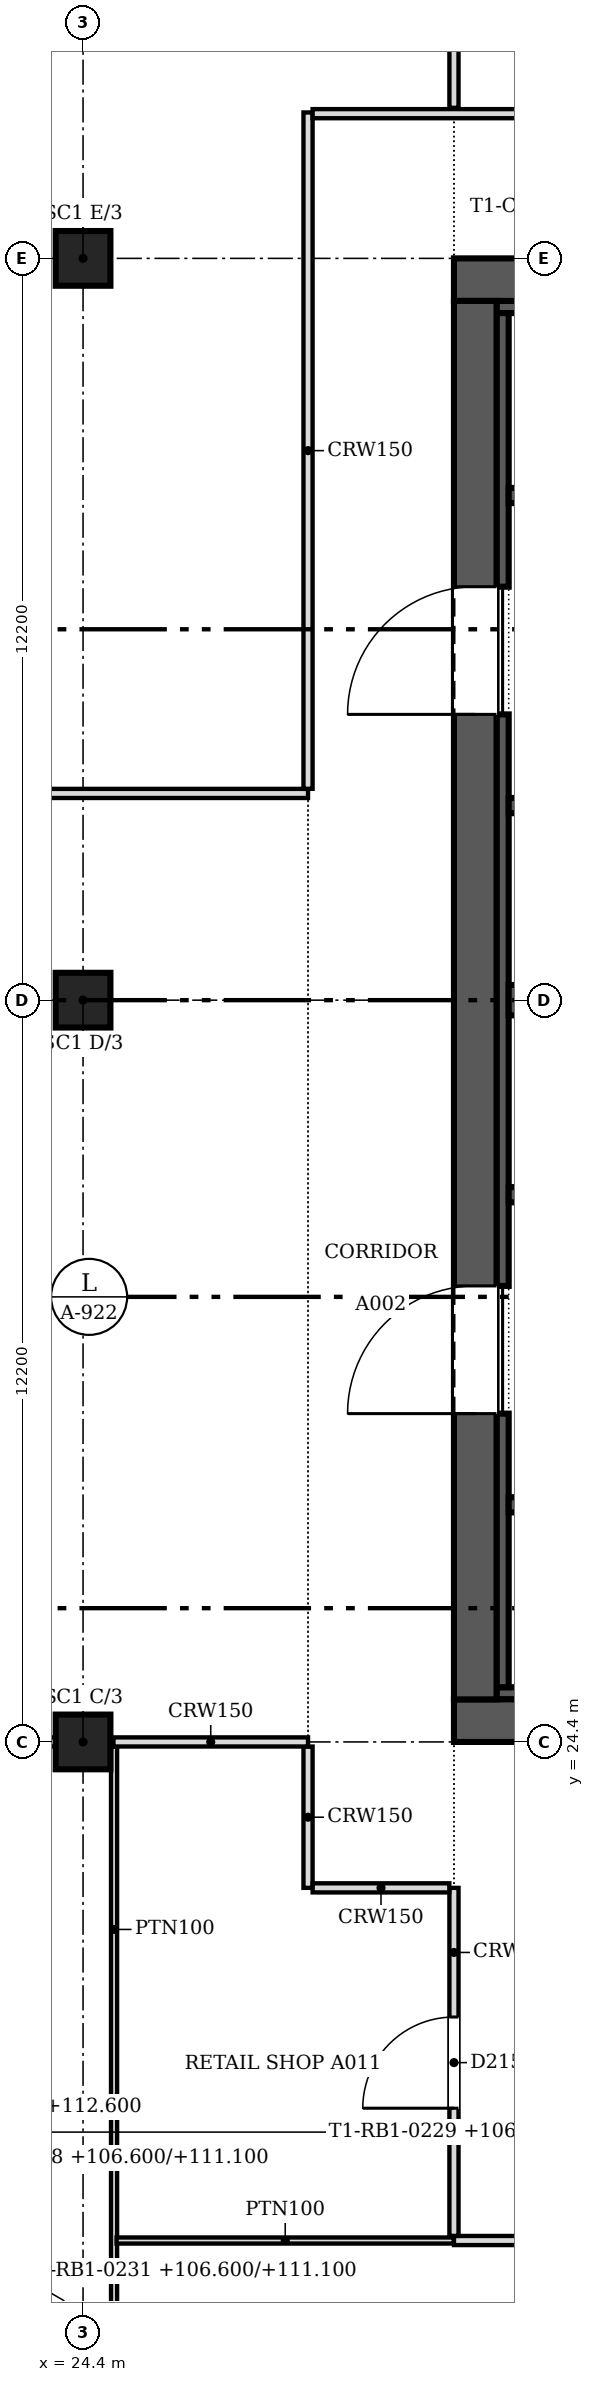
"""IFC4 building model, lengths in metres.
Left out: names, types, materials, properties, quantities, classifications, styles, units other than length and angle.
Written with IfcOpenShell. Run it as: python <this file> out.ifc"""

import sys

from ifc_helpers import new_model, si_unit, direction, frame, frame_2d, origin, origin_2d, place, context, subcontext, project, spatial, rectangle, extrude, faceted_brep, source, transform, mapped, element, fill, save


model = new_model("IFC4")
c1 = context("Model", 3, precision=1e-05, world=origin(), true_north=direction((0.0, 1.0)))
c2 = subcontext(c1, "Body", "Model", "MODEL_VIEW")
j1 = project(units=[si_unit("LENGTHUNIT", "METRE"), si_unit("PLANEANGLEUNIT", "RADIAN")], contexts=[c1])
p1 = place(None, origin())
s1 = spatial("IfcSite", under=j1, at=p1, CompositionType="ELEMENT")
p2 = place(p1, origin())
s2 = spatial("IfcBuilding", under=s1, at=p2, CompositionType="ELEMENT")
p3 = place(p2, frame((0.0, 0.0, 106.6)))
s3 = spatial("IfcBuildingStorey", under=s2, at=p3, CompositionType="ELEMENT", Elevation=106.6)
for number, where, z_axis, x_axis in (
    (1, (24.4, 24.4, 0.0), (0.0, 0.0, 1.0), (1.0, 0.0, 0.0)),
    (2, (24.4, 36.6, 0.0), (0.0, 0.0, 1.0), (1.0, 0.0, 0.0)),
    (3, (24.4, 48.8, 0.0), (0.0, 0.0, 1.0), (1.0, 0.0, 0.0)),
):
    element("IfcColumn", number, at=place(p3, frame(where, z_axis=z_axis, x_axis=x_axis)), inside=s3, PredefinedType="COLUMN", context=c2, shape_type="SweptSolid", body=[
        extrude(rectangle(XDim=0.9, YDim=0.9, at=origin_2d()), origin(), (0.0, 0.0, 1.0), 5.8),
    ])
m1 = source(origin(), c2, "Body", "Brep", [
    faceted_brep([(0.053, -0.25, 0.0), (0.8, -0.25, 0.0), (0.8, -0.25, 4.5), (0.053, -0.25, 4.5), (0.0, 0.25, 4.5), (0.8, 0.25, 4.5), (0.8, 0.25, 0.0), (0.0, 0.25, 0.0), (0.0, 0.0, 0.0), (0.0, 0.0, 4.5)], [[[0, 1, 2, 3]], [[4, 5, 6, 7]], [[7, 6, 1, 0, 8]], [[5, 4, 9, 3, 2]], [[4, 7, 8, 9]], [[8, 0, 3, 9]], [[1, 6, 5, 2]]]),
])
p4 = place(p3, frame((23.517, 15.185, 0.0), z_axis=(0.0, 0.0, 1.0), x_axis=(0.359735468129, -0.933054335486, 0.0)))
e4 = element("IfcWall", 4, at=p4, inside=s3, PredefinedType="SOLIDWALL", context=c2, shape_type="MappedRepresentation", body=[
    mapped(m1, transform((0.0, 0.0, 0.0), scale=1.0)),
])
m2 = source(origin(), c2, "Body", "Brep", [
    faceted_brep([(0.053, -0.25, 0.0), (3.103, -0.25, 0.0), (3.103, -0.25, 1.5), (0.053, -0.25, 1.5), (0.0, 0.25, 1.5), (3.149, 0.25, 1.5), (3.149, 0.25, 0.0), (0.0, 0.25, 0.0), (3.149, -0.0, 0.0), (0.0, 0.0, 0.0), (3.149, -0.0, 1.5), (0.0, 0.0, 1.5)], [[[0, 1, 2, 3]], [[4, 5, 6, 7]], [[7, 6, 8, 1, 0, 9]], [[6, 5, 10, 8]], [[5, 4, 11, 3, 2, 10]], [[4, 7, 9, 11]], [[9, 0, 3, 11]], [[1, 8, 10, 2]]]),
])
p5 = place(p3, frame((23.517, 15.185, 4.5), z_axis=(0.0, 0.0, 1.0), x_axis=(0.359841220347, -0.933013556246, 0.0)))
e5 = element("IfcWall", 5, at=p5, inside=s3, PredefinedType="SOLIDWALL", context=c2, shape_type="MappedRepresentation", body=[
    mapped(m2, transform((0.0, 0.0, 0.0), scale=1.0)),
])
p6 = place(p3, frame((54.9, 24.75, 0.0), z_axis=(0.0, 0.0, 1.0), x_axis=(-1.0, 0.0, 0.0)))
e6 = element("IfcWall", 6, at=p6, inside=s3, PredefinedType="SHEAR", context=c2, shape_type="SweptSolid", body=[
    extrude(rectangle(XDim=24.4, YDim=0.7, at=frame_2d((12.2, 0.0))), origin(), (0.0, 0.0, 1.0), 6.0),
])
m3 = source(origin(), c2, "Body", "SweptSolid", [
    extrude(rectangle(XDim=1.2, YDim=2.1, at=frame_2d((0.6, 1.05))), frame((0.0, 0.36, 0.0), z_axis=(0.0, -1.0, 0.0), x_axis=(1.0, 0.0, 0.0)), (0.0, 0.0, 1.0), 0.72),
])
p7 = place(p6, frame((1.5, 0.0, 0.0)))
e7 = element("IfcOpeningElement", 7, at=p7, cuts=e6, PredefinedType="OPENING", context=c2, shape_type="MappedRepresentation", body=[
    mapped(m3, transform((0.0, 0.0, 0.0), scale=1.0)),
])
p8 = place(p3, frame((30.85, 25.1, 0.0), z_axis=(0.0, 0.0, 1.0), x_axis=(0.0, 1.0, 0.0)))
e8 = element("IfcWall", 8, at=p8, inside=s3, PredefinedType="SHEAR", context=c2, shape_type="SweptSolid", body=[
    extrude(rectangle(XDim=23.0, YDim=0.7, at=frame_2d((11.5, 0.0))), origin(), (0.0, 0.0, 1.0), 6.0),
])
m4 = source(origin(), c2, "Body", "SweptSolid", [
    extrude(rectangle(XDim=2.1, YDim=2.4, at=frame_2d((1.05, 1.2))), frame((0.0, 0.36, 0.0), z_axis=(0.0, -1.0, 0.0), x_axis=(1.0, 0.0, 0.0)), (0.0, 0.0, 1.0), 0.72),
])
p9 = place(p8, frame((4.7, 0.0, 0.0)))
e9 = element("IfcOpeningElement", 9, at=p9, cuts=e8, PredefinedType="OPENING", context=c2, shape_type="MappedRepresentation", body=[
    mapped(m4, transform((0.0, 0.0, 0.0), scale=1.0)),
])
p10 = place(p8, frame((16.2, 0.0, 0.0)))
e10 = element("IfcOpeningElement", 10, at=p10, cuts=e8, PredefinedType="OPENING", context=c2, shape_type="MappedRepresentation", body=[
    mapped(m4, transform((0.0, 0.0, 0.0), scale=1.0)),
])
p11 = place(p3, frame((30.5, 48.45, 0.0), z_axis=(0.0, 0.0, 1.0), x_axis=(1.0, 0.0, 0.0)))
e11 = element("IfcWall", 11, at=p11, inside=s3, PredefinedType="SHEAR", context=c2, shape_type="SweptSolid", body=[
    extrude(rectangle(XDim=24.4, YDim=0.7, at=frame_2d((12.2, 0.0))), origin(), (0.0, 0.0, 1.0), 6.0),
])
p12 = place(p3, frame((31.2, 25.2, 0.0), z_axis=(0.0, 0.0, 1.0), x_axis=(1.0, 0.0, 0.0)))
e12 = element("IfcWall", 12, at=p12, inside=s3, PredefinedType="SOLIDWALL", context=c2, shape_type="SweptSolid", body=[
    extrude(rectangle(XDim=21.0, YDim=0.2, at=frame_2d((10.5, 0.0))), origin(), (0.0, 0.0, 1.0), 6.0),
])
p13 = place(p3, frame((31.2, 48.0, 0.0), z_axis=(0.0, 0.0, 1.0), x_axis=(1.0, 0.0, 0.0)))
e13 = element("IfcWall", 13, at=p13, inside=s3, PredefinedType="SOLIDWALL", context=c2, shape_type="SweptSolid", body=[
    extrude(rectangle(XDim=23.0, YDim=0.2, at=frame_2d((11.5, 0.0))), origin(), (0.0, 0.0, 1.0), 6.0),
])
p14 = place(p3, frame((31.3, 25.3, 0.0), z_axis=(0.0, 0.0, 1.0), x_axis=(0.0, 1.0, 0.0)))
e14 = element("IfcWall", 14, at=p14, inside=s3, PredefinedType="SOLIDWALL", context=c2, shape_type="SweptSolid", body=[
    extrude(rectangle(XDim=4.5, YDim=0.2, at=frame_2d((2.25, 0.0))), origin(), (0.0, 0.0, 1.0), 6.0),
])
p15 = place(p3, frame((31.3, 31.9, 0.0), z_axis=(0.0, 0.0, 1.0), x_axis=(0.0, 1.0, 0.0)))
e15 = element("IfcWall", 15, at=p15, inside=s3, PredefinedType="SOLIDWALL", context=c2, shape_type="SweptSolid", body=[
    extrude(rectangle(XDim=9.4, YDim=0.2, at=frame_2d((4.7, 0.0))), origin(), (0.0, 0.0, 1.0), 6.0),
])
p16 = place(p3, frame((31.3, 43.4, 0.0), z_axis=(0.0, 0.0, 1.0), x_axis=(0.0, 1.0, 0.0)))
e16 = element("IfcWall", 16, at=p16, inside=s3, PredefinedType="SOLIDWALL", context=c2, shape_type="SweptSolid", body=[
    extrude(rectangle(XDim=4.5, YDim=0.2, at=frame_2d((2.25, 0.0))), origin(), (0.0, 0.0, 1.0), 6.0),
])
p17 = place(p3, frame((31.4, 36.6, 0.0), z_axis=(0.0, 0.0, 1.0), x_axis=(1.0, 0.0, 0.0)))
e17 = element("IfcWall", 17, at=p17, inside=s3, PredefinedType="SHEAR", context=c2, shape_type="SweptSolid", body=[
    extrude(rectangle(XDim=16.95, YDim=0.5, at=frame_2d((8.475, 0.0))), origin(), (0.0, 0.0, 1.0), 6.0),
])
p18 = place(p3, frame((31.4, 33.4, 0.0), z_axis=(0.0, 0.0, 1.0), x_axis=(1.0, 0.0, 0.0)))
e18 = element("IfcWall", 18, at=p18, inside=s3, PredefinedType="SOLIDWALL", context=c2, shape_type="SweptSolid", body=[
    extrude(rectangle(XDim=11.05, YDim=0.25, at=frame_2d((5.525, 0.0))), origin(), (0.0, 0.0, 1.0), 5.8),
])
p19 = place(p3, frame((31.4, 39.8, 0.0), z_axis=(0.0, 0.0, 1.0), x_axis=(1.0, 0.0, 0.0)))
e19 = element("IfcWall", 19, at=p19, inside=s3, PredefinedType="SOLIDWALL", context=c2, shape_type="SweptSolid", body=[
    extrude(rectangle(XDim=11.05, YDim=0.25, at=frame_2d((5.525, 0.0))), origin(), (0.0, 0.0, 1.0), 6.0),
])
m5 = source(origin(), c2, "Body", "SweptSolid", [
    extrude(rectangle(XDim=1.1, YDim=2.1, at=frame_2d((0.55, 1.05))), frame((0.0, 0.135, 0.0), z_axis=(0.0, -1.0, 0.0), x_axis=(1.0, 0.0, 0.0)), (0.0, 0.0, 1.0), 0.27),
])
p20 = place(p19, frame((0.863, 0.0, 0.0)))
e20 = element("IfcOpeningElement", 20, at=p20, cuts=e19, PredefinedType="OPENING", context=c2, shape_type="MappedRepresentation", body=[
    mapped(m5, transform((0.0, 0.0, 0.0), scale=1.0)),
])
p21 = place(p19, frame((3.688, 0.0, 0.0)))
e21 = element("IfcOpeningElement", 21, at=p21, cuts=e19, PredefinedType="OPENING", context=c2, shape_type="MappedRepresentation", body=[
    mapped(m5, transform((0.0, 0.0, 0.0), scale=1.0)),
])
p22 = place(p19, frame((6.512, 0.0, 0.0)))
e22 = element("IfcOpeningElement", 22, at=p22, cuts=e19, PredefinedType="OPENING", context=c2, shape_type="MappedRepresentation", body=[
    mapped(m5, transform((0.0, 0.0, 0.0), scale=1.0)),
])
p23 = place(p19, frame((9.337, 0.0, 0.0)))
e23 = element("IfcOpeningElement", 23, at=p23, cuts=e19, PredefinedType="OPENING", context=c2, shape_type="MappedRepresentation", body=[
    mapped(m5, transform((0.0, 0.0, 0.0), scale=1.0)),
])
p24 = place(p3, frame((31.4, 28.3, 0.0), z_axis=(0.0, 0.0, 1.0), x_axis=(1.0, 0.0, 0.0)))
e24 = element("IfcWall", 24, at=p24, inside=s3, PredefinedType="SOLIDWALL", context=c2, shape_type="SweptSolid", body=[
    extrude(rectangle(XDim=11.05, YDim=0.25, at=frame_2d((5.525, 0.0))), origin(), (0.0, 0.0, 1.0), 5.8),
])
p25 = place(p3, frame((42.45, 44.9, 0.0), z_axis=(0.0, 0.0, 1.0), x_axis=(-1.0, 0.0, 0.0)))
e25 = element("IfcWall", 25, at=p25, inside=s3, PredefinedType="SOLIDWALL", context=c2, shape_type="SweptSolid", body=[
    extrude(rectangle(XDim=11.05, YDim=0.25, at=frame_2d((5.525, 0.0))), origin(), (0.0, 0.0, 1.0), 6.0),
])
p26 = place(p25, frame((9.087, 0.0, 0.0)))
e26 = element("IfcOpeningElement", 26, at=p26, cuts=e25, PredefinedType="OPENING", context=c2, shape_type="MappedRepresentation", body=[
    mapped(m5, transform((0.0, 0.0, 0.0), scale=1.0)),
])
p27 = place(p25, frame((6.262, 0.0, 0.0)))
e27 = element("IfcOpeningElement", 27, at=p27, cuts=e25, PredefinedType="OPENING", context=c2, shape_type="MappedRepresentation", body=[
    mapped(m5, transform((0.0, 0.0, 0.0), scale=1.0)),
])
p28 = place(p25, frame((3.438, 0.0, 0.0)))
e28 = element("IfcOpeningElement", 28, at=p28, cuts=e25, PredefinedType="OPENING", context=c2, shape_type="MappedRepresentation", body=[
    mapped(m5, transform((0.0, 0.0, 0.0), scale=1.0)),
])
p29 = place(p25, frame((0.613, 0.0, 0.0)))
e29 = element("IfcOpeningElement", 29, at=p29, cuts=e25, PredefinedType="OPENING", context=c2, shape_type="MappedRepresentation", body=[
    mapped(m5, transform((0.0, 0.0, 0.0), scale=1.0)),
])
p30 = place(p3, frame((24.91, 12.293, 0.0), z_axis=(0.0, 0.0, 1.0), x_axis=(0.0, 1.0, 0.0)))
e30 = element("IfcWall", 30, at=p30, inside=s3, PredefinedType="PARTITIONING", context=c2, shape_type="SweptSolid", body=[
    extrude(rectangle(XDim=12.031, YDim=0.1, at=frame_2d((6.015, 0.0))), origin(), (0.0, 0.0, 1.0), 5.167),
])
p31 = place(p3, frame((24.951, 16.2, 0.0), z_axis=(0.0, 0.0, 1.0), x_axis=(1.0, 0.0, 0.0)))
e31 = element("IfcWall", 31, at=p31, inside=s3, PredefinedType="PARTITIONING", context=c2, shape_type="SweptSolid", body=[
    extrude(rectangle(XDim=5.548, YDim=0.1, at=frame_2d((2.774, 0.0))), origin(), (0.0, 0.0, 1.0), 5.167),
])
p32 = place(p3, frame((44.0, 16.2, 0.0), z_axis=(0.0, 0.0, 1.0), x_axis=(-1.0, 0.0, 0.0)))
e32 = element("IfcWall", 32, at=p32, inside=s3, PredefinedType="PARTITIONING", context=c2, shape_type="SweptSolid", body=[
    extrude(rectangle(XDim=13.5, YDim=0.15, at=frame_2d((6.75, 0.0))), origin(), (0.0, 0.0, 1.0), 5.167),
])
m6 = source(origin(), c2, "Body", "SweptSolid", [
    extrude(rectangle(XDim=1.8, YDim=2.1, at=frame_2d((0.9, 1.05))), frame((0.0, 0.085, 0.0), z_axis=(0.0, -1.0, 0.0), x_axis=(1.0, 0.0, 0.0)), (0.0, 0.0, 1.0), 0.17),
])
p33 = place(p32, frame((5.9, 0.0, 0.0)))
e33 = element("IfcOpeningElement", 33, at=p33, cuts=e32, PredefinedType="OPENING", context=c2, shape_type="MappedRepresentation", body=[
    mapped(m6, transform((0.0, 0.0, 0.0), scale=1.0)),
])
p34 = place(p3, frame((30.5, 16.276, 0.0), z_axis=(0.0, 0.0, 1.0), x_axis=(0.0, 1.0, 0.0)))
e34 = element("IfcWall", 34, at=p34, inside=s3, PredefinedType="PARTITIONING", context=c2, shape_type="SweptSolid", body=[
    extrude(rectangle(XDim=5.724, YDim=0.15, at=frame_2d((2.862, 0.0))), origin(), (0.0, 0.0, 1.0), 5.167),
])
m7 = source(origin(), c2, "Body", "SweptSolid", [
    extrude(rectangle(XDim=1.5, YDim=2.1, at=frame_2d((0.75, 1.05))), frame((0.0, 0.085, 0.0), z_axis=(0.0, -1.0, 0.0), x_axis=(1.0, 0.0, 0.0)), (0.0, 0.0, 1.0), 0.17),
])
p35 = place(p34, frame((2.1, 0.0, 0.0)))
e35 = element("IfcOpeningElement", 35, at=p35, cuts=e34, PredefinedType="OPENING", context=c2, shape_type="MappedRepresentation", body=[
    mapped(m7, transform((0.0, 0.0, 0.0), scale=1.0)),
])
p36 = place(p3, frame((28.1, 22.0, 0.0), z_axis=(0.0, 0.0, 1.0), x_axis=(0.0, 1.0, 0.0)))
e36 = element("IfcWall", 36, at=p36, inside=s3, PredefinedType="PARTITIONING", context=c2, shape_type="SweptSolid", body=[
    extrude(rectangle(XDim=2.324, YDim=0.15, at=frame_2d((1.162, 0.0))), origin(), (0.0, 0.0, 1.0), 5.167),
])
p37 = place(p3, frame((28.176, 22.0, 0.0), z_axis=(0.0, 0.0, 1.0), x_axis=(1.0, 0.0, 0.0)))
e37 = element("IfcWall", 37, at=p37, inside=s3, PredefinedType="PARTITIONING", context=c2, shape_type="SweptSolid", body=[
    extrude(rectangle(XDim=2.248, YDim=0.15, at=frame_2d((1.124, 0.0))), origin(), (0.0, 0.0, 1.0), 5.167),
])
p38 = place(p3, frame((23.949, 24.4, 0.0), z_axis=(0.0, 0.0, 1.0), x_axis=(-1.0, 0.0, 0.0)))
e38 = element("IfcWall", 38, at=p38, inside=s3, PredefinedType="PARTITIONING", context=c2, shape_type="SweptSolid", body=[
    extrude(rectangle(XDim=11.298, YDim=0.15, at=frame_2d((5.649, 0.0))), origin(), (0.0, 0.0, 1.0), 5.167),
])
p39 = place(p38, frame((4.898, 0.0, 0.0)))
e39 = element("IfcOpeningElement", 39, at=p39, cuts=e38, PredefinedType="OPENING", context=c2, shape_type="MappedRepresentation", body=[
    mapped(m7, transform((0.0, 0.0, 0.0), scale=1.0)),
])
p40 = place(p3, frame((24.9, 24.4, 0.0), z_axis=(0.0, 0.0, 1.0), x_axis=(1.0, 0.0, 0.0)))
e40 = element("IfcWall", 40, at=p40, inside=s3, PredefinedType="PARTITIONING", context=c2, shape_type="SweptSolid", body=[
    extrude(rectangle(XDim=3.2, YDim=0.15, at=frame_2d((1.6, 0.0))), origin(), (0.0, 0.0, 1.0), 5.167),
])
p41 = place(p3, frame((12.2, 40.0, 0.0), z_axis=(0.0, 0.0, 1.0), x_axis=(1.0, 0.0, 0.0)))
e41 = element("IfcWall", 41, at=p41, inside=s3, PredefinedType="PARTITIONING", context=c2, shape_type="SweptSolid", body=[
    extrude(rectangle(XDim=15.9, YDim=0.15, at=frame_2d((7.95, 0.0))), origin(), (0.0, 0.0, 1.0), 5.167),
])
p42 = place(p3, frame((28.1, 40.076, 0.0), z_axis=(0.0, 0.0, 1.0), x_axis=(0.0, 1.0, 0.0)))
e42 = element("IfcWall", 42, at=p42, inside=s3, PredefinedType="PARTITIONING", context=c2, shape_type="SweptSolid", body=[
    extrude(rectangle(XDim=11.124, YDim=0.15, at=frame_2d((5.562, 0.0))), origin(), (0.0, 0.0, 1.0), 5.167),
])
p43 = place(p3, frame((28.176, 51.18, 0.0), z_axis=(0.0, 0.0, 1.0), x_axis=(1.0, 0.0, 0.0)))
e43 = element("IfcWall", 43, at=p43, inside=s3, PredefinedType="PARTITIONING", context=c2, shape_type="SweptSolid", body=[
    extrude(rectangle(XDim=31.362, YDim=0.15, at=frame_2d((15.681, 0.0))), origin(), (0.0, 0.0, 1.0), 5.167),
])
m8 = source(origin(), c2, "Body", "SweptSolid", [
    extrude(rectangle(XDim=0.9, YDim=2.1, at=frame_2d((0.45, 1.05))), frame((0.0, 0.085, 0.0), z_axis=(0.0, -1.0, 0.0), x_axis=(1.0, 0.0, 0.0)), (0.0, 0.0, 1.0), 0.17),
])
p44 = place(p43, frame((11.025, 0.0, 0.0)))
e44 = element("IfcOpeningElement", 44, at=p44, cuts=e43, PredefinedType="OPENING", context=c2, shape_type="MappedRepresentation", body=[
    mapped(m8, transform((0.0, 0.0, 0.0), scale=1.0)),
])
p45 = place(p43, frame((4.924, 0.0, 0.0)))
e45 = element("IfcOpeningElement", 45, at=p45, cuts=e43, PredefinedType="OPENING", context=c2, shape_type="MappedRepresentation", body=[
    mapped(m8, transform((0.0, 0.0, 0.0), scale=1.0)),
])
p46 = place(p43, frame((27.075, 0.0, 0.0)))
e46 = element("IfcOpeningElement", 46, at=p46, cuts=e43, PredefinedType="OPENING", context=c2, shape_type="MappedRepresentation", body=[
    mapped(m8, transform((0.0, 0.0, 0.0), scale=1.0)),
])
p47 = place(p43, frame((18.624, 0.0, 0.0)))
e47 = element("IfcOpeningElement", 47, at=p47, cuts=e43, PredefinedType="OPENING", context=c2, shape_type="MappedRepresentation", body=[
    mapped(m8, transform((0.0, 0.0, 0.0), scale=1.0)),
])
p48 = place(p3, frame((30.5, 51.276, 0.0), z_axis=(0.0, 0.0, 1.0), x_axis=(0.0, 1.0, 0.0)))
e48 = element("IfcWall", 48, at=p48, inside=s3, PredefinedType="PARTITIONING", context=c2, shape_type="SweptSolid", body=[
    extrude(rectangle(XDim=3.124, YDim=0.15, at=frame_2d((1.562, 0.0))), origin(), (0.0, 0.0, 1.0), 5.167),
])
m9 = source(origin(), c2, "Body", "SweptSolid", [
    extrude(rectangle(XDim=2.1, YDim=2.4, at=frame_2d((1.05, 1.2))), frame((0.0, 0.025, 0.0), z_axis=(0.0, -1.0, 0.0), x_axis=(1.0, 0.0, 0.0)), (0.0, 0.0, 1.0), 0.05),
])
p49 = place(p9, origin())
e49 = element("IfcDoor", 49, at=p49, inside=s3, OperationType="DOUBLE_DOOR_SINGLE_SWING", PredefinedType="DOOR", context=c2, shape_type="MappedRepresentation", body=[
    mapped(m9, transform((0.0, 0.0, 0.0), scale=1.0)),
])
fill(e9, e49)
p50 = place(p10, origin())
e50 = element("IfcDoor", 50, at=p50, inside=s3, OperationType="DOUBLE_DOOR_SINGLE_SWING", PredefinedType="DOOR", context=c2, shape_type="MappedRepresentation", body=[
    mapped(m9, transform((0.0, 0.0, 0.0), scale=1.0)),
])
fill(e10, e50)
m10 = source(origin(), c2, "Body", "SweptSolid", [
    extrude(rectangle(XDim=1.5, YDim=2.1, at=frame_2d((0.75, 1.05))), frame((0.0, 0.025, 0.0), z_axis=(0.0, -1.0, 0.0), x_axis=(1.0, 0.0, 0.0)), (0.0, 0.0, 1.0), 0.05),
])
p51 = place(p35, origin())
e51 = element("IfcDoor", 51, at=p51, inside=s3, OperationType="SINGLE_SWING_LEFT", PredefinedType="DOOR", context=c2, shape_type="MappedRepresentation", body=[
    mapped(m10, transform((0.0, 0.0, 0.0), scale=1.0)),
])
fill(e35, e51)
save(model, sys.argv[1])
